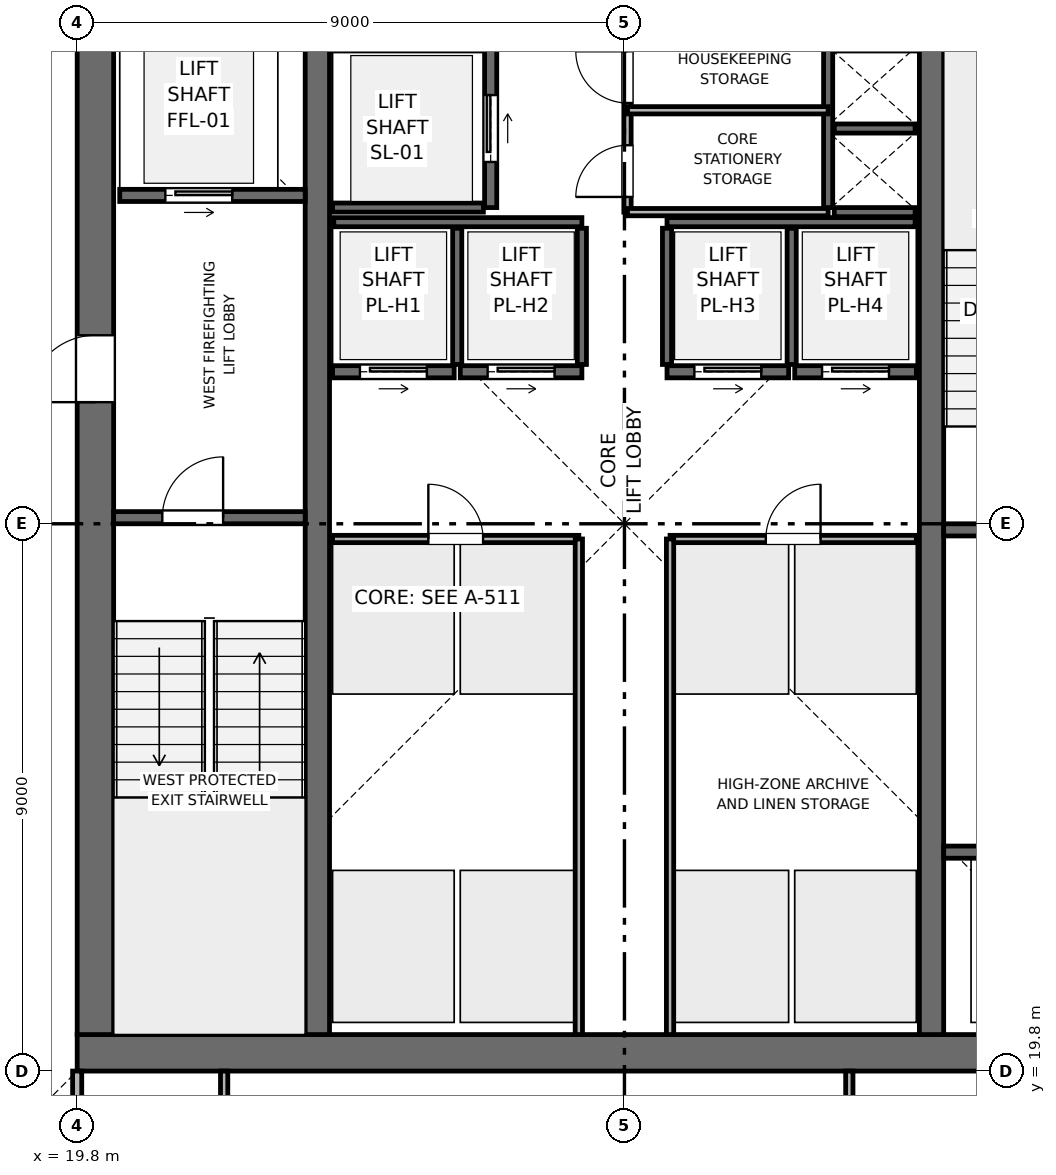
"""IFC4 building model, lengths in metres.
Left out: names, types, materials, properties, quantities, classifications, styles, units other than length and angle.
Written with IfcOpenShell. Run it as: python <this file> out.ifc"""

import sys

from ifc_helpers import new_model, si_unit, direction, frame, frame_2d, origin, place, context, subcontext, project, spatial, rectangle, extrude, element, fill, save


model = new_model("IFC4")
c1 = context("Model", 3, precision=1e-05, world=origin(), true_north=direction((0.0, 1.0)))
c2 = subcontext(c1, "Body", "Model", "MODEL_VIEW")
j1 = project(units=[si_unit("LENGTHUNIT", "METRE"), si_unit("PLANEANGLEUNIT", "RADIAN")], contexts=[c1])
p1 = place(None, origin())
s1 = spatial("IfcSite", under=j1, at=p1, CompositionType="ELEMENT")
p2 = place(p1, origin())
s2 = spatial("IfcBuilding", under=s1, at=p2, CompositionType="ELEMENT")
p3 = place(p2, frame((0.0, 0.0, 295.5)))
s3 = spatial("IfcBuildingStorey", under=s2, at=p3, CompositionType="ELEMENT", Elevation=295.5)
p4 = place(p3, frame((19.8, 20.1, 0.0), z_axis=(0.0, 0.0, 1.0), x_axis=(1.0, 0.0, 0.0)))
e1 = element("IfcWall", 1, at=p4, inside=s3, PredefinedType="SHEAR", context=c2, shape_type="SweptSolid", body=[
    extrude(rectangle(XDim=18.0, YDim=0.6, at=frame_2d((9.0, 0.0))), origin(), (0.0, 0.0, 1.0), 3.75),
])
p5 = place(p3, frame((20.1, 20.4, 0.0), z_axis=(0.0, 0.0, 1.0), x_axis=(0.0, 1.0, 0.0)))
e2 = element("IfcWall", 2, at=p5, inside=s3, PredefinedType="SHEAR", context=c2, shape_type="SweptSolid", body=[
    extrude(rectangle(XDim=16.8, YDim=0.6, at=frame_2d((8.4, 0.0))), origin(), (0.0, 0.0, 1.0), 3.75),
])
p6 = place(p5, frame((10.4, 0.0, 0.0)))
e3 = element("IfcOpeningElement", 3, at=p6, cuts=e2, PredefinedType="OPENING", context=c2, shape_type="SweptSolid", body=[
    extrude(rectangle(XDim=1.1, YDim=2.15, at=frame_2d((0.55, 1.075))), frame((0.0, 0.31, 0.0), z_axis=(0.0, -1.0, 0.0), x_axis=(1.0, 0.0, 0.0)), (0.0, 0.0, 1.0), 0.62),
])
for number, where, z_axis, x_axis in (
    (4, (23.75, 20.4, 0.0), (0.0, 0.0, 1.0), (0.0, 1.0, 0.0)),
    (5, (33.85, 20.4, 0.0), (0.0, 0.0, 1.0), (0.0, 1.0, 0.0)),
):
    element("IfcWall", number, at=place(p3, frame(where, z_axis=z_axis, x_axis=x_axis)), inside=s3, PredefinedType="SHEAR", context=c2, shape_type="SweptSolid", body=[
        extrude(rectangle(XDim=16.8, YDim=0.4, at=frame_2d((8.4, 0.0))), origin(), (0.0, 0.0, 1.0), 3.75),
    ])
p7 = place(p3, frame((20.4, 28.9, 0.0), z_axis=(0.0, 0.0, 1.0), x_axis=(1.0, 0.0, 0.0)))
e6 = element("IfcWall", 6, at=p7, inside=s3, PredefinedType="SHEAR", context=c2, shape_type="SweptSolid", body=[
    extrude(rectangle(XDim=3.15, YDim=0.2, at=frame_2d((1.575, 0.0))), origin(), (0.0, 0.0, 1.0), 3.51),
])
p8 = place(p7, frame((0.8, 0.0, 0.0)))
e7 = element("IfcOpeningElement", 7, at=p8, cuts=e6, PredefinedType="OPENING", context=c2, shape_type="SweptSolid", body=[
    extrude(rectangle(XDim=1.0, YDim=2.1, at=frame_2d((0.5, 1.05))), frame((0.0, 0.11, 0.0), z_axis=(0.0, -1.0, 0.0), x_axis=(1.0, 0.0, 0.0)), (0.0, 0.0, 1.0), 0.22),
])
p9 = place(p3, frame((34.05, 28.7, 0.0), z_axis=(0.0, 0.0, 1.0), x_axis=(1.0, 0.0, 0.0)))
e8 = element("IfcWall", 8, at=p9, inside=s3, PredefinedType="SHEAR", context=c2, shape_type="SweptSolid", body=[
    extrude(rectangle(XDim=3.15, YDim=0.2, at=frame_2d((1.575, 0.0))), origin(), (0.0, 0.0, 1.0), 3.51),
])
p10 = place(p9, frame((0.8, 0.0, 0.0)))
e9 = element("IfcOpeningElement", 9, at=p10, cuts=e8, PredefinedType="OPENING", context=c2, shape_type="SweptSolid", body=[
    extrude(rectangle(XDim=1.0, YDim=2.1, at=frame_2d((0.5, 1.05))), frame((0.0, 0.11, 0.0), z_axis=(0.0, -1.0, 0.0), x_axis=(1.0, 0.0, 0.0)), (0.0, 0.0, 1.0), 0.22),
])
p11 = place(p3, frame((32.15, 34.0, 0.0), z_axis=(0.0, 0.0, 1.0), x_axis=(0.0, 1.0, 0.0)))
e10 = element("IfcWall", 10, at=p11, inside=s3, PredefinedType="SHEAR", context=c2, shape_type="SweptSolid", body=[
    extrude(rectangle(XDim=3.2, YDim=0.15, at=frame_2d((1.6, 0.0))), origin(), (0.0, 0.0, 1.0), 3.51),
])
for number, where, z_axis, x_axis in (
    (11, (32.25, 33.925, 0.0), (0.0, 0.0, 1.0), (1.0, 0.0, 0.0)),
    (12, (32.25, 35.3, 0.0), (0.0, 0.0, 1.0), (1.0, 0.0, 0.0)),
):
    element("IfcWall", number, at=place(p3, frame(where, z_axis=z_axis, x_axis=x_axis)), inside=s3, PredefinedType="SHEAR", context=c2, shape_type="SweptSolid", body=[
        extrude(rectangle(XDim=1.33, YDim=0.15, at=frame_2d((0.665, 0.0))), origin(), (0.0, 0.0, 1.0), 3.51),
    ])
p12 = place(p3, frame((20.5, 34.2, 0.0), z_axis=(0.0, 0.0, 1.0), x_axis=(1.0, 0.0, 0.0)))
e13 = element("IfcWall", 13, at=p12, inside=s3, PredefinedType="SHEAR", context=c2, shape_type="SweptSolid", body=[
    extrude(rectangle(XDim=3.05, YDim=0.2, at=frame_2d((1.525, 0.0))), origin(), (0.0, 0.0, 1.0), 3.51),
])
p13 = place(p12, frame((0.75, 0.0, 0.0)))
e14 = element("IfcOpeningElement", 14, at=p13, cuts=e13, PredefinedType="OPENING", context=c2, shape_type="SweptSolid", body=[
    extrude(rectangle(XDim=1.1, YDim=2.15, at=frame_2d((0.55, 1.075))), frame((0.0, 0.11, 0.0), z_axis=(0.0, -1.0, 0.0), x_axis=(1.0, 0.0, 0.0)), (0.0, 0.0, 1.0), 0.22),
])
p14 = place(p3, frame((34.05, 23.4, 0.0), z_axis=(0.0, 0.0, 1.0), x_axis=(1.0, 0.0, 0.0)))
e15 = element("IfcWall", 15, at=p14, inside=s3, PredefinedType="SHEAR", context=c2, shape_type="SweptSolid", body=[
    extrude(rectangle(XDim=3.05, YDim=0.2, at=frame_2d((1.525, 0.0))), origin(), (0.0, 0.0, 1.0), 3.51),
])
p15 = place(p14, frame((1.2, 0.0, 0.0)))
e16 = element("IfcOpeningElement", 16, at=p15, cuts=e15, PredefinedType="OPENING", context=c2, shape_type="SweptSolid", body=[
    extrude(rectangle(XDim=1.1, YDim=2.15, at=frame_2d((0.55, 1.075))), frame((0.0, 0.11, 0.0), z_axis=(0.0, -1.0, 0.0), x_axis=(1.0, 0.0, 0.0)), (0.0, 0.0, 1.0), 0.22),
])
p16 = place(p3, frame((26.6, 34.0, 0.0), z_axis=(0.0, 0.0, 1.0), x_axis=(0.0, 1.0, 0.0)))
e17 = element("IfcWall", 17, at=p16, inside=s3, PredefinedType="SHEAR", context=c2, shape_type="SweptSolid", body=[
    extrude(rectangle(XDim=3.2, YDim=0.2, at=frame_2d((1.6, 0.0))), origin(), (0.0, 0.0, 1.0), 3.51),
])
p17 = place(p16, frame((0.75, 0.0, 0.0)))
e18 = element("IfcOpeningElement", 18, at=p17, cuts=e17, PredefinedType="OPENING", context=c2, shape_type="SweptSolid", body=[
    extrude(rectangle(XDim=1.1, YDim=2.15, at=frame_2d((0.55, 1.075))), frame((0.0, 0.11, 0.0), z_axis=(0.0, -1.0, 0.0), x_axis=(1.0, 0.0, 0.0)), (0.0, 0.0, 1.0), 0.22),
])
p18 = place(p3, frame((24.0, 34.0, 0.0), z_axis=(0.0, 0.0, 1.0), x_axis=(1.0, 0.0, 0.0)))
e19 = element("IfcWall", 19, at=p18, inside=s3, PredefinedType="SHEAR", context=c2, shape_type="SweptSolid", body=[
    extrude(rectangle(XDim=2.48, YDim=0.15, at=frame_2d((1.24, 0.0))), origin(), (0.0, 0.0, 1.0), 3.51),
])
p19 = place(p3, frame((24.0, 31.3, 0.0), z_axis=(0.0, 0.0, 1.0), x_axis=(1.0, 0.0, 0.0)))
e20 = element("IfcWall", 20, at=p19, inside=s3, PredefinedType="SHEAR", context=c2, shape_type="SweptSolid", body=[
    extrude(rectangle(XDim=2.0, YDim=0.2, at=frame_2d((1.0, 0.0))), origin(), (0.0, 0.0, 1.0), 3.51),
])
p20 = place(p19, frame((0.45, 0.0, 0.0)))
e21 = element("IfcOpeningElement", 21, at=p20, cuts=e20, PredefinedType="OPENING", context=c2, shape_type="SweptSolid", body=[
    extrude(rectangle(XDim=1.1, YDim=2.15, at=frame_2d((0.55, 1.075))), frame((0.0, 0.11, 0.0), z_axis=(0.0, -1.0, 0.0), x_axis=(1.0, 0.0, 0.0)), (0.0, 0.0, 1.0), 0.22),
])
p21 = place(p3, frame((26.1, 31.3, 0.0), z_axis=(0.0, 0.0, 1.0), x_axis=(1.0, 0.0, 0.0)))
e22 = element("IfcWall", 22, at=p21, inside=s3, PredefinedType="SHEAR", context=c2, shape_type="SweptSolid", body=[
    extrude(rectangle(XDim=2.0, YDim=0.2, at=frame_2d((1.0, 0.0))), origin(), (0.0, 0.0, 1.0), 3.51),
])
p22 = place(p21, frame((0.45, 0.0, 0.0)))
e23 = element("IfcOpeningElement", 23, at=p22, cuts=e22, PredefinedType="OPENING", context=c2, shape_type="SweptSolid", body=[
    extrude(rectangle(XDim=1.1, YDim=2.15, at=frame_2d((0.55, 1.075))), frame((0.0, 0.11, 0.0), z_axis=(0.0, -1.0, 0.0), x_axis=(1.0, 0.0, 0.0)), (0.0, 0.0, 1.0), 0.22),
])
p23 = place(p3, frame((29.5, 31.3, 0.0), z_axis=(0.0, 0.0, 1.0), x_axis=(1.0, 0.0, 0.0)))
e24 = element("IfcWall", 24, at=p23, inside=s3, PredefinedType="SHEAR", context=c2, shape_type="SweptSolid", body=[
    extrude(rectangle(XDim=2.0, YDim=0.2, at=frame_2d((1.0, 0.0))), origin(), (0.0, 0.0, 1.0), 3.51),
])
p24 = place(p23, frame((0.45, 0.0, 0.0)))
e25 = element("IfcOpeningElement", 25, at=p24, cuts=e24, PredefinedType="OPENING", context=c2, shape_type="SweptSolid", body=[
    extrude(rectangle(XDim=1.1, YDim=2.15, at=frame_2d((0.55, 1.075))), frame((0.0, 0.11, 0.0), z_axis=(0.0, -1.0, 0.0), x_axis=(1.0, 0.0, 0.0)), (0.0, 0.0, 1.0), 0.22),
])
p25 = place(p3, frame((31.6, 31.3, 0.0), z_axis=(0.0, 0.0, 1.0), x_axis=(1.0, 0.0, 0.0)))
e26 = element("IfcWall", 26, at=p25, inside=s3, PredefinedType="SHEAR", context=c2, shape_type="SweptSolid", body=[
    extrude(rectangle(XDim=2.0, YDim=0.2, at=frame_2d((1.0, 0.0))), origin(), (0.0, 0.0, 1.0), 3.51),
])
p26 = place(p25, frame((0.45, 0.0, 0.0)))
e27 = element("IfcOpeningElement", 27, at=p26, cuts=e26, PredefinedType="OPENING", context=c2, shape_type="SweptSolid", body=[
    extrude(rectangle(XDim=1.1, YDim=2.15, at=frame_2d((0.55, 1.075))), frame((0.0, 0.11, 0.0), z_axis=(0.0, -1.0, 0.0), x_axis=(1.0, 0.0, 0.0)), (0.0, 0.0, 1.0), 0.22),
])
for number, where, z_axis, x_axis in (
    (28, (24.02, 33.76, 0.0), (0.0, 0.0, 1.0), (1.0, 0.0, 0.0)),
    (29, (29.5, 33.76, 0.0), (0.0, 0.0, 1.0), (1.0, 0.0, 0.0)),
):
    element("IfcWall", number, at=place(p3, frame(where, z_axis=z_axis, x_axis=x_axis)), inside=s3, PredefinedType="SHEAR", context=c2, shape_type="SweptSolid", body=[
        extrude(rectangle(XDim=4.08, YDim=0.15, at=frame_2d((2.04, 0.0))), origin(), (0.0, 0.0, 1.0), 3.51),
    ])
for number, where, z_axis, x_axis in (
    (30, (26.05, 31.42, 0.0), (0.0, 0.0, 1.0), (0.0, 1.0, 0.0)),
    (31, (28.1, 31.42, 0.0), (0.0, 0.0, 1.0), (0.0, 1.0, 0.0)),
    (32, (29.5, 31.42, 0.0), (0.0, 0.0, 1.0), (0.0, 1.0, 0.0)),
    (33, (31.55, 31.42, 0.0), (0.0, 0.0, 1.0), (0.0, 1.0, 0.0)),
):
    element("IfcWall", number, at=place(p3, frame(where, z_axis=z_axis, x_axis=x_axis)), inside=s3, PredefinedType="SHEAR", context=c2, shape_type="SweptSolid", body=[
        extrude(rectangle(XDim=2.24, YDim=0.15, at=frame_2d((1.12, 0.0))), origin(), (0.0, 0.0, 1.0), 3.51),
    ])
p27 = place(p3, frame((28.85, 33.925, 0.0), z_axis=(0.0, 0.0, 1.0), x_axis=(0.0, 1.0, 0.0)))
e34 = element("IfcWall", 34, at=p27, inside=s3, PredefinedType="PARTITIONING", context=c2, shape_type="SweptSolid", body=[
    extrude(rectangle(XDim=3.275, YDim=0.12, at=frame_2d((1.637, 0.0))), origin(), (0.0, 0.0, 1.0), 3.51),
])
p28 = place(p27, frame((0.25, 0.0, 0.0)))
e35 = element("IfcOpeningElement", 35, at=p28, cuts=e34, PredefinedType="OPENING", context=c2, shape_type="SweptSolid", body=[
    extrude(rectangle(XDim=0.85, YDim=2.1, at=frame_2d((0.425, 1.05))), frame((0.0, 0.07, 0.0), z_axis=(0.0, -1.0, 0.0), x_axis=(1.0, 0.0, 0.0)), (0.0, 0.0, 1.0), 0.14),
])
p29 = place(p27, frame((1.795, 0.0, 0.0)))
e36 = element("IfcOpeningElement", 36, at=p29, cuts=e34, PredefinedType="OPENING", context=c2, shape_type="SweptSolid", body=[
    extrude(rectangle(XDim=0.85, YDim=2.1, at=frame_2d((0.425, 1.05))), frame((0.0, 0.07, 0.0), z_axis=(0.0, -1.0, 0.0), x_axis=(1.0, 0.0, 0.0)), (0.0, 0.0, 1.0), 0.14),
])
for number, where, z_axis, x_axis in (
    (37, (28.85, 35.6, 0.0), (0.0, 0.0, 1.0), (1.0, 0.0, 0.0)),
    (38, (28.85, 33.925, 0.0), (0.0, 0.0, 1.0), (1.0, 0.0, 0.0)),
):
    element("IfcWall", number, at=place(p3, frame(where, z_axis=z_axis, x_axis=x_axis)), inside=s3, PredefinedType="PARTITIONING", context=c2, shape_type="SweptSolid", body=[
        extrude(rectangle(XDim=3.3, YDim=0.12, at=frame_2d((1.65, 0.0))), origin(), (0.0, 0.0, 1.0), 3.51),
    ])
p30 = place(p3, frame((24.0, 28.55, 0.0), z_axis=(0.0, 0.0, 1.0), x_axis=(1.0, 0.0, 0.0)))
e39 = element("IfcWall", 39, at=p30, inside=s3, PredefinedType="PARTITIONING", context=c2, shape_type="SweptSolid", body=[
    extrude(rectangle(XDim=4.05, YDim=0.12, at=frame_2d((2.025, 0.0))), origin(), (0.0, 0.0, 1.0), 3.51),
])
p31 = place(p30, frame((1.575, 0.0, 0.0)))
e40 = element("IfcOpeningElement", 40, at=p31, cuts=e39, PredefinedType="OPENING", context=c2, shape_type="SweptSolid", body=[
    extrude(rectangle(XDim=0.9, YDim=2.1, at=frame_2d((0.45, 1.05))), frame((0.0, 0.07, 0.0), z_axis=(0.0, -1.0, 0.0), x_axis=(1.0, 0.0, 0.0)), (0.0, 0.0, 1.0), 0.14),
])
p32 = place(p3, frame((28.05, 20.4, 0.0), z_axis=(0.0, 0.0, 1.0), x_axis=(0.0, 1.0, 0.0)))
e41 = element("IfcWall", 41, at=p32, inside=s3, PredefinedType="PARTITIONING", context=c2, shape_type="SweptSolid", body=[
    extrude(rectangle(XDim=8.15, YDim=0.12, at=frame_2d((4.075, 0.0))), origin(), (0.0, 0.0, 1.0), 3.51),
])
p33 = place(p3, frame((29.55, 28.55, 0.0), z_axis=(0.0, 0.0, 1.0), x_axis=(1.0, 0.0, 0.0)))
e42 = element("IfcWall", 42, at=p33, inside=s3, PredefinedType="PARTITIONING", context=c2, shape_type="SweptSolid", body=[
    extrude(rectangle(XDim=4.05, YDim=0.12, at=frame_2d((2.025, 0.0))), origin(), (0.0, 0.0, 1.0), 3.51),
])
p34 = place(p33, frame((1.575, 0.0, 0.0)))
e43 = element("IfcOpeningElement", 43, at=p34, cuts=e42, PredefinedType="OPENING", context=c2, shape_type="SweptSolid", body=[
    extrude(rectangle(XDim=0.9, YDim=2.1, at=frame_2d((0.45, 1.05))), frame((0.0, 0.07, 0.0), z_axis=(0.0, -1.0, 0.0), x_axis=(1.0, 0.0, 0.0)), (0.0, 0.0, 1.0), 0.14),
])
p35 = place(p3, frame((29.55, 20.4, 0.0), z_axis=(0.0, 0.0, 1.0), x_axis=(0.0, 1.0, 0.0)))
e44 = element("IfcWall", 44, at=p35, inside=s3, PredefinedType="PARTITIONING", context=c2, shape_type="SweptSolid", body=[
    extrude(rectangle(XDim=8.15, YDim=0.12, at=frame_2d((4.075, 0.0))), origin(), (0.0, 0.0, 1.0), 3.51),
])
p36 = place(p3, frame((19.8, 6.13, 0.0), z_axis=(0.0, 0.0, 1.0), x_axis=(0.0, 1.0, 0.0)))
e45 = element("IfcWall", 45, at=p36, inside=s3, PredefinedType="PARTITIONING", context=c2, shape_type="SweptSolid", body=[
    extrude(rectangle(XDim=13.67, YDim=0.15, at=frame_2d((6.835, 0.0))), origin(), (0.0, 0.0, 1.0), 3.095),
])
p37 = place(p36, frame((9.47, 0.0, 0.0)))
e46 = element("IfcOpeningElement", 46, at=p37, cuts=e45, PredefinedType="OPENING", context=c2, shape_type="SweptSolid", body=[
    extrude(rectangle(XDim=0.9, YDim=2.1, at=frame_2d((0.45, 1.05))), frame((0.0, 0.085, 0.0), z_axis=(0.0, -1.0, 0.0), x_axis=(1.0, 0.0, 0.0)), (0.0, 0.0, 1.0), 0.17),
])
p38 = place(p3, frame((22.217, 6.13, 0.0), z_axis=(0.0, 0.0, 1.0), x_axis=(0.0, 1.0, 0.0)))
e47 = element("IfcWall", 47, at=p38, inside=s3, PredefinedType="PARTITIONING", context=c2, shape_type="SweptSolid", body=[
    extrude(rectangle(XDim=13.67, YDim=0.12, at=frame_2d((6.835, 0.0))), origin(), (0.0, 0.0, 1.0), 3.135),
])
p39 = place(p38, frame((11.27, 0.0, 0.0)))
e48 = element("IfcOpeningElement", 48, at=p39, cuts=e47, PredefinedType="OPENING", context=c2, shape_type="SweptSolid", body=[
    extrude(rectangle(XDim=0.9, YDim=2.1, at=frame_2d((0.45, 1.05))), frame((0.0, 0.07, 0.0), z_axis=(0.0, -1.0, 0.0), x_axis=(1.0, 0.0, 0.0)), (0.0, 0.0, 1.0), 0.14),
])
p40 = place(p3, frame((32.498, 6.13, 0.0), z_axis=(0.0, 0.0, 1.0), x_axis=(0.0, 1.0, 0.0)))
e49 = element("IfcWall", 49, at=p40, inside=s3, PredefinedType="PARTITIONING", context=c2, shape_type="SweptSolid", body=[
    extrude(rectangle(XDim=13.67, YDim=0.12, at=frame_2d((6.835, 0.0))), origin(), (0.0, 0.0, 1.0), 3.135),
])
p41 = place(p40, frame((11.27, 0.0, 0.0)))
e50 = element("IfcOpeningElement", 50, at=p41, cuts=e49, PredefinedType="OPENING", context=c2, shape_type="SweptSolid", body=[
    extrude(rectangle(XDim=0.9, YDim=2.1, at=frame_2d((0.45, 1.05))), frame((0.0, 0.07, 0.0), z_axis=(0.0, -1.0, 0.0), x_axis=(1.0, 0.0, 0.0)), (0.0, 0.0, 1.0), 0.14),
])
p42 = place(p8, origin())
e51 = element("IfcDoor", 51, at=p42, inside=s3, OperationType="SINGLE_SWING_RIGHT", PredefinedType="DOOR", context=c2, shape_type="SweptSolid", body=[
    extrude(rectangle(XDim=1.0, YDim=2.1, at=frame_2d((0.5, 1.05))), frame((0.0, 0.025, 0.0), z_axis=(0.0, -1.0, 0.0), x_axis=(1.0, 0.0, 0.0)), (0.0, 0.0, 1.0), 0.05),
])
fill(e7, e51)
p43 = place(p13, origin())
e52 = element("IfcDoor", 52, at=p43, inside=s3, OperationType="SLIDING_TO_RIGHT", PredefinedType="DOOR", context=c2, shape_type="SweptSolid", body=[
    extrude(rectangle(XDim=1.1, YDim=2.15, at=frame_2d((0.55, 1.075))), frame((0.0, 0.025, 0.0), z_axis=(0.0, -1.0, 0.0), x_axis=(1.0, 0.0, 0.0)), (0.0, 0.0, 1.0), 0.05),
])
fill(e14, e52)
p44 = place(p17, origin())
e53 = element("IfcDoor", 53, at=p44, inside=s3, OperationType="SLIDING_TO_RIGHT", PredefinedType="DOOR", context=c2, shape_type="SweptSolid", body=[
    extrude(rectangle(XDim=1.1, YDim=2.15, at=frame_2d((0.55, 1.075))), frame((0.0, 0.025, 0.0), z_axis=(0.0, -1.0, 0.0), x_axis=(1.0, 0.0, 0.0)), (0.0, 0.0, 1.0), 0.05),
])
fill(e18, e53)
p45 = place(p20, origin())
e54 = element("IfcDoor", 54, at=p45, inside=s3, OperationType="SLIDING_TO_RIGHT", PredefinedType="DOOR", context=c2, shape_type="SweptSolid", body=[
    extrude(rectangle(XDim=1.1, YDim=2.15, at=frame_2d((0.55, 1.075))), frame((0.0, 0.025, 0.0), z_axis=(0.0, -1.0, 0.0), x_axis=(1.0, 0.0, 0.0)), (0.0, 0.0, 1.0), 0.05),
])
fill(e21, e54)
p46 = place(p22, origin())
e55 = element("IfcDoor", 55, at=p46, inside=s3, OperationType="SLIDING_TO_RIGHT", PredefinedType="DOOR", context=c2, shape_type="SweptSolid", body=[
    extrude(rectangle(XDim=1.1, YDim=2.15, at=frame_2d((0.55, 1.075))), frame((0.0, 0.025, 0.0), z_axis=(0.0, -1.0, 0.0), x_axis=(1.0, 0.0, 0.0)), (0.0, 0.0, 1.0), 0.05),
])
fill(e23, e55)
p47 = place(p24, origin())
e56 = element("IfcDoor", 56, at=p47, inside=s3, OperationType="SLIDING_TO_RIGHT", PredefinedType="DOOR", context=c2, shape_type="SweptSolid", body=[
    extrude(rectangle(XDim=1.1, YDim=2.15, at=frame_2d((0.55, 1.075))), frame((0.0, 0.025, 0.0), z_axis=(0.0, -1.0, 0.0), x_axis=(1.0, 0.0, 0.0)), (0.0, 0.0, 1.0), 0.05),
])
fill(e25, e56)
p48 = place(p26, origin())
e57 = element("IfcDoor", 57, at=p48, inside=s3, OperationType="SLIDING_TO_RIGHT", PredefinedType="DOOR", context=c2, shape_type="SweptSolid", body=[
    extrude(rectangle(XDim=1.1, YDim=2.15, at=frame_2d((0.55, 1.075))), frame((0.0, 0.025, 0.0), z_axis=(0.0, -1.0, 0.0), x_axis=(1.0, 0.0, 0.0)), (0.0, 0.0, 1.0), 0.05),
])
fill(e27, e57)
p49 = place(p28, origin())
e58 = element("IfcDoor", 58, at=p49, inside=s3, OperationType="SINGLE_SWING_LEFT", PredefinedType="DOOR", context=c2, shape_type="SweptSolid", body=[
    extrude(rectangle(XDim=0.85, YDim=2.1, at=frame_2d((0.425, 1.05))), frame((0.0, 0.025, 0.0), z_axis=(0.0, -1.0, 0.0), x_axis=(1.0, 0.0, 0.0)), (0.0, 0.0, 1.0), 0.05),
])
fill(e35, e58)
p50 = place(p29, origin())
e59 = element("IfcDoor", 59, at=p50, inside=s3, OperationType="SINGLE_SWING_RIGHT", PredefinedType="DOOR", context=c2, shape_type="SweptSolid", body=[
    extrude(rectangle(XDim=0.85, YDim=2.1, at=frame_2d((0.425, 1.05))), frame((0.0, 0.025, 0.0), z_axis=(0.0, -1.0, 0.0), x_axis=(1.0, 0.0, 0.0)), (0.0, 0.0, 1.0), 0.05),
])
fill(e36, e59)
p51 = place(p31, origin())
e60 = element("IfcDoor", 60, at=p51, inside=s3, OperationType="SINGLE_SWING_LEFT", PredefinedType="DOOR", context=c2, shape_type="SweptSolid", body=[
    extrude(rectangle(XDim=0.9, YDim=2.1, at=frame_2d((0.45, 1.05))), frame((0.0, 0.025, 0.0), z_axis=(0.0, -1.0, 0.0), x_axis=(1.0, 0.0, 0.0)), (0.0, 0.0, 1.0), 0.05),
])
fill(e40, e60)
p52 = place(p34, origin())
e61 = element("IfcDoor", 61, at=p52, inside=s3, OperationType="SINGLE_SWING_RIGHT", PredefinedType="DOOR", context=c2, shape_type="SweptSolid", body=[
    extrude(rectangle(XDim=0.9, YDim=2.1, at=frame_2d((0.45, 1.05))), frame((0.0, 0.025, 0.0), z_axis=(0.0, -1.0, 0.0), x_axis=(1.0, 0.0, 0.0)), (0.0, 0.0, 1.0), 0.05),
])
fill(e43, e61)
p53 = place(p6, origin())
e62 = element("IfcDoor", 62, at=p53, inside=s3, OperationType="SINGLE_SWING_LEFT", PredefinedType="DOOR", context=c2, shape_type="SweptSolid", body=[
    extrude(rectangle(XDim=1.1, YDim=2.15, at=frame_2d((0.55, 1.075))), frame((0.0, 0.025, 0.0), z_axis=(0.0, -1.0, 0.0), x_axis=(1.0, 0.0, 0.0)), (0.0, 0.0, 1.0), 0.05),
])
fill(e3, e62)
save(model, sys.argv[1])
